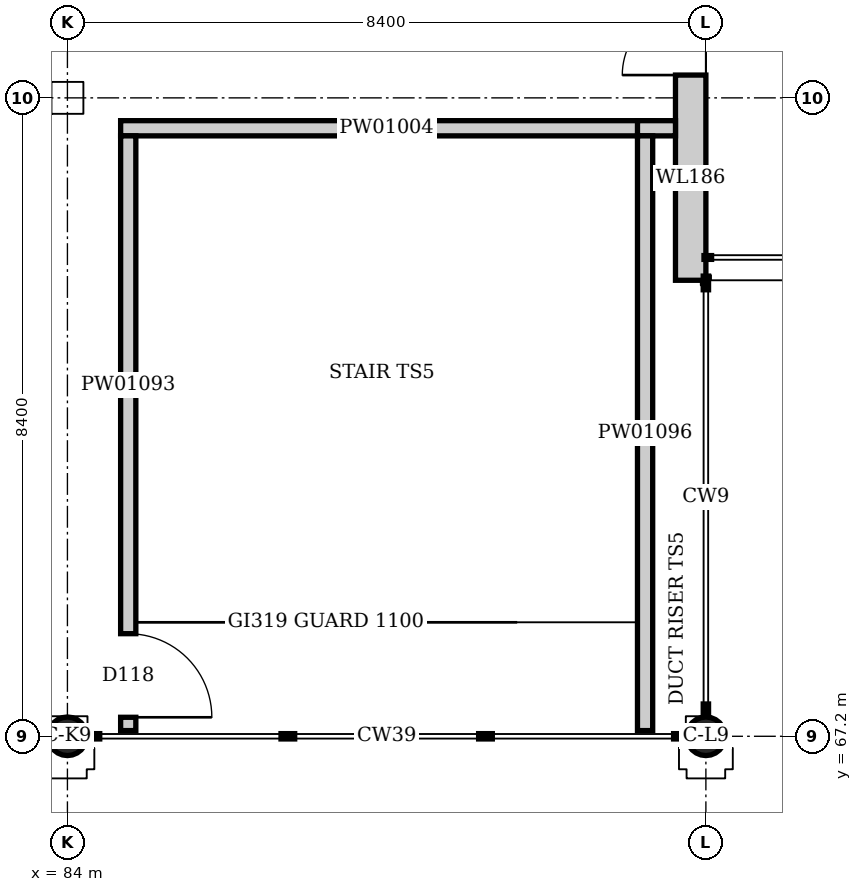
"""IFC4 building model, lengths in metres.
Left out: names, types, materials, properties, quantities, classifications, styles, units other than length and angle.
Written with IfcOpenShell. Run it as: python <this file> out.ifc"""

import sys

from ifc_helpers import new_model, si_unit, direction, frame, frame_2d, origin, origin_2d, place, context, subcontext, project, spatial, rectangle, hollow_circle, extrude, element, fill, save


model = new_model("IFC4")
c1 = context("Model", 3, precision=1e-05, world=origin(), true_north=direction((0.0, 1.0)))
c2 = subcontext(c1, "Body", "Model", "MODEL_VIEW")
j1 = project(units=[si_unit("LENGTHUNIT", "METRE"), si_unit("PLANEANGLEUNIT", "RADIAN")], contexts=[c1])
p1 = place(None, origin())
s1 = spatial("IfcSite", under=j1, at=p1, CompositionType="ELEMENT")
p2 = place(p1, origin())
s2 = spatial("IfcBuilding", under=s1, at=p2, CompositionType="ELEMENT")
p3 = place(p2, frame((0.0, 0.0, 6.0)))
s3 = spatial("IfcBuildingStorey", under=s2, at=p3, CompositionType="ELEMENT", Elevation=6.0)
for number, where, z_axis, x_axis in (
    (1, (84.0, 67.2, 0.0), (0.0, 0.0, 1.0), (1.0, 0.0, 0.0)),
    (2, (92.4, 67.2, 0.0), (0.0, 0.0, 1.0), (1.0, 0.0, 0.0)),
):
    element("IfcColumn", number, at=place(p3, frame(where, z_axis=z_axis, x_axis=x_axis)), inside=s3, PredefinedType="COLUMN", context=c2, shape_type="SweptSolid", body=[
        extrude(hollow_circle(Radius=0.254, WallThickness=0.016, at=origin_2d()), origin(), (0.0, 0.0, 1.0), 4.8),
    ])
p4 = place(p3, frame((92.2, 73.2, 0.0), z_axis=(0.0, 0.0, 1.0), x_axis=(0.0, 1.0, 0.0)))
e3 = element("IfcWall", 3, at=p4, inside=s3, PredefinedType="SOLIDWALL", context=c2, shape_type="SweptSolid", body=[
    extrude(rectangle(XDim=4.8, YDim=0.4, at=frame_2d((2.4, 0.0))), origin(), (0.0, 0.0, 1.0), 4.6),
])
p5 = place(p4, frame((2.7, 0.0, 0.0)))
e4 = element("IfcOpeningElement", 4, at=p5, cuts=e3, PredefinedType="OPENING", context=c2, shape_type="SweptSolid", body=[
    extrude(rectangle(XDim=1.8, YDim=2.0, at=frame_2d((0.9, 1.0))), frame((0.0, 0.21, 0.0), z_axis=(0.0, -1.0, 0.0), x_axis=(1.0, 0.0, 0.0)), (0.0, 0.0, 1.0), 0.42),
])
p6 = place(p3, frame((84.7, 75.2, 0.0), z_axis=(0.0, 0.0, 1.0), x_axis=(1.0, 0.0, 0.0)))
e5 = element("IfcWall", 5, at=p6, inside=s3, PredefinedType="PARTITIONING", context=c2, shape_type="SweptSolid", body=[
    extrude(rectangle(XDim=7.0, YDim=0.2, at=frame_2d((3.5, 0.0))), origin(), (0.0, 0.0, 1.0), 4.6),
])
p7 = place(p3, frame((91.5, 75.2, 0.0), z_axis=(0.0, 0.0, 1.0), x_axis=(1.0, 0.0, 0.0)))
e6 = element("IfcWall", 6, at=p7, inside=s3, PredefinedType="PARTITIONING", context=c2, shape_type="SweptSolid", body=[
    extrude(rectangle(XDim=0.5, YDim=0.2, at=frame_2d((0.25, 0.0))), origin(), (0.0, 0.0, 1.0), 4.6),
])
p8 = place(p3, frame((84.8, 67.275, 0.0), z_axis=(0.0, 0.0, 1.0), x_axis=(0.0, 1.0, 0.0)))
e7 = element("IfcWall", 7, at=p8, inside=s3, PredefinedType="PARTITIONING", context=c2, shape_type="SweptSolid", body=[
    extrude(rectangle(XDim=7.825, YDim=0.2, at=frame_2d((3.913, 0.0))), origin(), (0.0, 0.0, 1.0), 4.6),
])
p9 = place(p8, frame((0.175, 0.0, 0.0)))
e8 = element("IfcOpeningElement", 8, at=p9, cuts=e7, PredefinedType="OPENING", context=c2, shape_type="SweptSolid", body=[
    extrude(rectangle(XDim=1.1, YDim=2.4, at=frame_2d((0.55, 1.2))), frame((0.0, 0.11, 0.0), z_axis=(0.0, -1.0, 0.0), x_axis=(1.0, 0.0, 0.0)), (0.0, 0.0, 1.0), 0.22),
])
p10 = place(p3, frame((91.6, 67.275, 0.0), z_axis=(0.0, 0.0, 1.0), x_axis=(0.0, 1.0, 0.0)))
e9 = element("IfcWall", 9, at=p10, inside=s3, PredefinedType="PARTITIONING", context=c2, shape_type="SweptSolid", body=[
    extrude(rectangle(XDim=7.825, YDim=0.2, at=frame_2d((3.913, 0.0))), origin(), (0.0, 0.0, 1.0), 4.6),
])
p11 = place(p9, frame((1.1, 0.0, 0.0), z_axis=(0.0, 0.0, 1.0), x_axis=(-1.0, 0.0, 0.0)))
e10 = element("IfcDoor", 10, at=p11, inside=s3, OperationType="SINGLE_SWING_RIGHT", PredefinedType="DOOR", context=c2, shape_type="SweptSolid", body=[
    extrude(rectangle(XDim=1.1, YDim=2.4, at=frame_2d((0.55, 1.2))), frame((0.0, 0.025, 0.0), z_axis=(0.0, -1.0, 0.0), x_axis=(1.0, 0.0, 0.0)), (0.0, 0.0, 1.0), 0.05),
])
fill(e8, e10)
p12 = place(p5, origin())
e11 = element("IfcDoor", 11, at=p12, inside=s3, OperationType="DOUBLE_DOOR_SINGLE_SWING", PredefinedType="DOOR", context=c2, shape_type="SweptSolid", body=[
    extrude(rectangle(XDim=1.8, YDim=2.0, at=frame_2d((0.9, 1.0))), frame((0.0, 0.025, 0.0), z_axis=(0.0, -1.0, 0.0), x_axis=(1.0, 0.0, 0.0)), (0.0, 0.0, 1.0), 0.05),
])
fill(e4, e11)
save(model, sys.argv[1])
